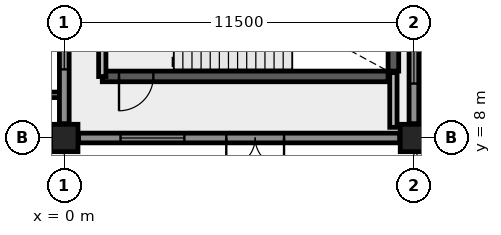
"""IFC4 building model, lengths in metres.
Left out: names, types, materials, properties, quantities, classifications, styles, units other than length and angle.
Written with IfcOpenShell. Run it as: python <this file> out.ifc"""

import sys

from ifc_helpers import new_model, si_unit, direction, frame, frame_2d, origin, origin_2d, place, context, subcontext, project, spatial, rectangle, circle, extrude, element, fill, save


model = new_model("IFC4")
c1 = context("Model", 3, precision=1e-05, world=origin(), true_north=direction((0.0, 1.0)))
c2 = subcontext(c1, "Body", "Model", "MODEL_VIEW")
j1 = project(units=[si_unit("LENGTHUNIT", "METRE"), si_unit("PLANEANGLEUNIT", "RADIAN")], contexts=[c1])
p1 = place(None, origin())
s1 = spatial("IfcSite", under=j1, at=p1, CompositionType="ELEMENT")
p2 = place(p1, origin())
s2 = spatial("IfcBuilding", under=s1, at=p2, CompositionType="ELEMENT")
p3 = place(p2, origin())
s3 = spatial("IfcBuildingStorey", under=s2, at=p3, CompositionType="ELEMENT", Elevation=0.0)
for number, where, z_axis, x_axis in (
    (1, (0.0, 8.0, 0.0), (0.0, 0.0, 1.0), (1.0, 0.0, 0.0)),
    (2, (11.5, 8.0, 0.0), (0.0, 0.0, 1.0), (1.0, 0.0, 0.0)),
):
    element("IfcColumn", number, at=place(p3, frame(where, z_axis=z_axis, x_axis=x_axis)), inside=s3, PredefinedType="COLUMN", context=c2, shape_type="SweptSolid", body=[
        extrude(circle(Radius=0.45, at=origin_2d()), origin(), (0.0, 0.0, 1.0), 4.2),
    ])
p4 = place(p3, frame((1.25, 10.025, 0.0), z_axis=(0.0, 0.0, 1.0), x_axis=(1.0, 0.0, 0.0)))
e3 = element("IfcWall", 3, at=p4, inside=s3, PredefinedType="SHEAR", context=c2, shape_type="SweptSolid", body=[
    extrude(rectangle(XDim=9.4, YDim=0.35, at=frame_2d((4.7, 0.0))), origin(), (0.0, 0.0, 1.0), 4.2),
])
p5 = place(p4, frame((0.55, 0.0, 0.0)))
e4 = element("IfcOpeningElement", 4, at=p5, cuts=e3, PredefinedType="OPENING", context=c2, shape_type="SweptSolid", body=[
    extrude(rectangle(XDim=1.13, YDim=2.15, at=frame_2d((0.565, 1.075))), frame((0.0, 0.185, 0.0), z_axis=(0.0, -1.0, 0.0), x_axis=(1.0, 0.0, 0.0)), (0.0, 0.0, 1.0), 0.37),
])
p6 = place(p3, frame((10.825, 10.2, 0.0), z_axis=(0.0, 0.0, 1.0), x_axis=(0.0, 1.0, 0.0)))
e5 = element("IfcWall", 5, at=p6, inside=s3, PredefinedType="SHEAR", context=c2, shape_type="SweptSolid", body=[
    extrude(rectangle(XDim=3.8, YDim=0.35, at=frame_2d((1.9, 0.0))), origin(), (0.0, 0.0, 1.0), 4.2),
])
p7 = place(p3, frame((0.47, 8.0, 0.0), z_axis=(0.0, 0.0, 1.0), x_axis=(1.0, 0.0, 0.0)))
e6 = element("IfcWall", 6, at=p7, inside=s3, PredefinedType="SOLIDWALL", context=c2, shape_type="SweptSolid", body=[
    extrude(rectangle(XDim=10.56, YDim=0.32, at=frame_2d((5.28, 0.0))), origin(), (0.0, 0.0, 1.0), 3.0),
])
p8 = place(p7, frame((4.858, 0.0, 0.0)))
e7 = element("IfcOpeningElement", 7, at=p8, cuts=e6, PredefinedType="OPENING", context=c2, shape_type="SweptSolid", body=[
    extrude(rectangle(XDim=1.9, YDim=2.2, at=frame_2d((0.95, 1.1))), frame((0.0, 0.17, 0.0), z_axis=(0.0, -1.0, 0.0), x_axis=(1.0, 0.0, 0.0)), (0.0, 0.0, 1.0), 0.34),
])
p9 = place(p7, frame((1.379, 0.0, 0.78)))
e8 = element("IfcOpeningElement", 8, at=p9, cuts=e6, PredefinedType="OPENING", context=c2, shape_type="SweptSolid", body=[
    extrude(rectangle(XDim=2.1, YDim=2.1, at=frame_2d((1.05, 1.05))), frame((0.0, 0.17, 0.0), z_axis=(0.0, -1.0, 0.0), x_axis=(1.0, 0.0, 0.0)), (0.0, 0.0, 1.0), 0.34),
])
p10 = place(p3, frame((11.5, 8.47, 0.0), z_axis=(0.0, 0.0, 1.0), x_axis=(0.0, 1.0, 0.0)))
e9 = element("IfcWall", 9, at=p10, inside=s3, PredefinedType="SOLIDWALL", context=c2, shape_type="SweptSolid", body=[
    extrude(rectangle(XDim=8.76, YDim=0.32, at=frame_2d((4.38, 0.0))), origin(), (0.0, 0.0, 1.0), 3.0),
])
p11 = place(p10, frame((1.32, 0.0, 0.84)))
e10 = element("IfcOpeningElement", 10, at=p11, cuts=e9, PredefinedType="OPENING", context=c2, shape_type="SweptSolid", body=[
    extrude(rectangle(XDim=2.4, YDim=2.1, at=frame_2d((1.2, 1.05))), frame((0.0, 0.17, 0.0), z_axis=(0.0, -1.0, 0.0), x_axis=(1.0, 0.0, 0.0)), (0.0, 0.0, 1.0), 0.34),
])
p12 = place(p10, frame((5.04, 0.0, 0.84)))
e11 = element("IfcOpeningElement", 11, at=p12, cuts=e9, PredefinedType="OPENING", context=c2, shape_type="SweptSolid", body=[
    extrude(rectangle(XDim=2.4, YDim=2.1, at=frame_2d((1.2, 1.05))), frame((0.0, 0.17, 0.0), z_axis=(0.0, -1.0, 0.0), x_axis=(1.0, 0.0, 0.0)), (0.0, 0.0, 1.0), 0.34),
])
p13 = place(p3, frame((0.0, 8.47, 0.0), z_axis=(0.0, 0.0, 1.0), x_axis=(0.0, 1.0, 0.0)))
e12 = element("IfcWall", 12, at=p13, inside=s3, PredefinedType="SOLIDWALL", context=c2, shape_type="SweptSolid", body=[
    extrude(rectangle(XDim=8.76, YDim=0.32, at=frame_2d((4.38, 0.0))), origin(), (0.0, 0.0, 1.0), 3.2),
])
p14 = place(p13, frame((1.787, 0.0, 0.85)))
e13 = element("IfcOpeningElement", 13, at=p14, cuts=e12, PredefinedType="OPENING", context=c2, shape_type="SweptSolid", body=[
    extrude(rectangle(XDim=1.7, YDim=1.5, at=frame_2d((0.85, 0.75))), frame((0.0, 0.17, 0.0), z_axis=(0.0, -1.0, 0.0), x_axis=(1.0, 0.0, 0.0)), (0.0, 0.0, 1.0), 0.34),
])
p15 = place(p13, frame((5.273, 0.0, 0.85)))
e14 = element("IfcOpeningElement", 14, at=p15, cuts=e12, PredefinedType="OPENING", context=c2, shape_type="SweptSolid", body=[
    extrude(rectangle(XDim=1.7, YDim=1.5, at=frame_2d((0.85, 0.75))), frame((0.0, 0.17, 0.0), z_axis=(0.0, -1.0, 0.0), x_axis=(1.0, 0.0, 0.0)), (0.0, 0.0, 1.0), 0.34),
])
p16 = place(p3, frame((1.25, 10.02, 0.0), z_axis=(0.0, 0.0, 1.0), x_axis=(0.0, 1.0, 0.0)))
e15 = element("IfcWall", 15, at=p16, inside=s3, PredefinedType="SOLIDWALL", context=c2, shape_type="SweptSolid", body=[
    extrude(rectangle(XDim=4.16, YDim=0.24, at=frame_2d((2.08, 0.0))), origin(), (0.0, 0.0, 1.0), 3.88),
])
p17 = place(p3, frame((10.825, 8.35, 0.0), z_axis=(0.0, 0.0, 1.0), x_axis=(0.0, 1.0, 0.0)))
e16 = element("IfcWall", 16, at=p17, inside=s3, PredefinedType="SOLIDWALL", context=c2, shape_type="SweptSolid", body=[
    extrude(rectangle(XDim=1.8, YDim=0.24, at=frame_2d((0.9, 0.0))), origin(), (0.0, 0.0, 1.0), 3.88),
])
p18 = place(p8, frame((0.95, 0.0, 0.0), z_axis=(0.0, 0.0, 1.0), x_axis=(-1.0, 0.0, 0.0)))
e17 = element("IfcDoor", 17, at=p18, inside=s3, OperationType="DOUBLE_DOOR_SINGLE_SWING", PredefinedType="DOOR", context=c2, shape_type="SweptSolid", body=[
    extrude(rectangle(XDim=1.9, YDim=2.2, at=frame_2d((0.0, 1.1))), frame((0.0, 0.025, 0.0), z_axis=(0.0, -1.0, 0.0), x_axis=(1.0, 0.0, 0.0)), (0.0, 0.0, 1.0), 0.05),
])
fill(e7, e17)
p19 = place(p9, origin())
e18 = element("IfcWindow", 18, at=p19, inside=s3, PartitioningType="SINGLE_PANEL", PredefinedType="WINDOW", context=c2, shape_type="SweptSolid", body=[
    extrude(rectangle(XDim=2.1, YDim=2.1, at=frame_2d((1.05, 1.05))), frame((0.0, 0.03, 0.0), z_axis=(0.0, -1.0, 0.0), x_axis=(1.0, 0.0, 0.0)), (0.0, 0.0, 1.0), 0.06),
])
fill(e8, e18)
p20 = place(p11, origin())
e19 = element("IfcWindow", 19, at=p20, inside=s3, PartitioningType="SINGLE_PANEL", PredefinedType="WINDOW", context=c2, shape_type="SweptSolid", body=[
    extrude(rectangle(XDim=2.4, YDim=2.1, at=frame_2d((1.2, 1.05))), frame((0.0, 0.03, 0.0), z_axis=(0.0, -1.0, 0.0), x_axis=(1.0, 0.0, 0.0)), (0.0, 0.0, 1.0), 0.06),
])
fill(e10, e19)
p21 = place(p14, origin())
e20 = element("IfcWindow", 20, at=p21, inside=s3, PartitioningType="SINGLE_PANEL", PredefinedType="WINDOW", context=c2, shape_type="SweptSolid", body=[
    extrude(rectangle(XDim=1.7, YDim=1.5, at=frame_2d((0.85, 0.75))), frame((0.0, 0.03, 0.0), z_axis=(0.0, -1.0, 0.0), x_axis=(1.0, 0.0, 0.0)), (0.0, 0.0, 1.0), 0.06),
])
fill(e13, e20)
p22 = place(p5, frame((0.565, 0.0, 0.0), z_axis=(0.0, 0.0, 1.0), x_axis=(-1.0, 0.0, 0.0)))
e21 = element("IfcDoor", 21, at=p22, inside=s3, OperationType="SINGLE_SWING_LEFT", PredefinedType="DOOR", context=c2, shape_type="SweptSolid", body=[
    extrude(rectangle(XDim=1.13, YDim=2.15, at=frame_2d((0.0, 1.075))), frame((0.0, 0.025, 0.0), z_axis=(0.0, -1.0, 0.0), x_axis=(1.0, 0.0, 0.0)), (0.0, 0.0, 1.0), 0.05),
])
fill(e4, e21)
save(model, sys.argv[1])
